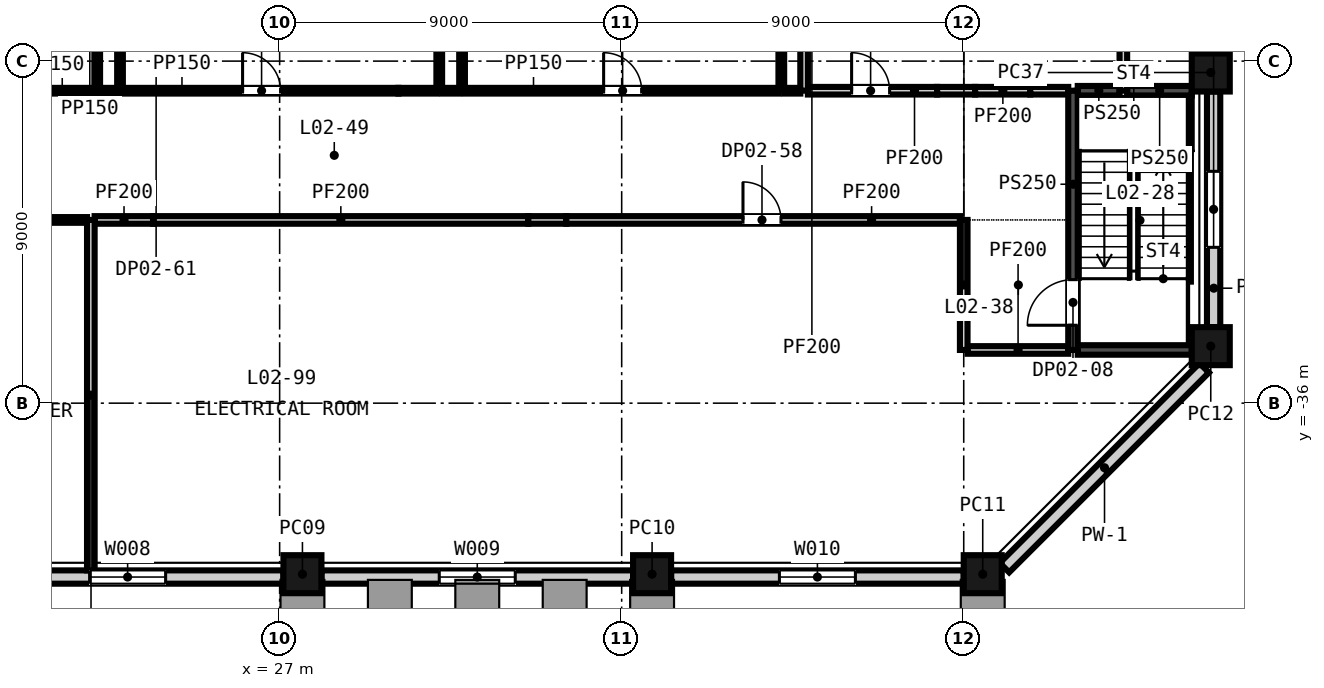
"""IFC4 building model, lengths in metres.
Left out: names, types, materials, properties, quantities, classifications, styles, units other than length and angle.
Written with IfcOpenShell. Run it as: python <this file> out.ifc"""

import sys

from ifc_helpers import new_model, si_unit, direction, frame, frame_2d, origin, origin_2d, place, context, subcontext, project, spatial, rectangle, extrude, element, fill, save


model = new_model("IFC4")
c1 = context("Model", 3, precision=1e-05, world=origin(), true_north=direction((0.0, 1.0)))
c2 = subcontext(c1, "Body", "Model", "MODEL_VIEW")
j1 = project(units=[si_unit("LENGTHUNIT", "METRE"), si_unit("PLANEANGLEUNIT", "RADIAN")], contexts=[c1])
p1 = place(None, origin())
s1 = spatial("IfcSite", under=j1, at=p1, CompositionType="ELEMENT")
p2 = place(p1, origin())
s2 = spatial("IfcBuilding", under=s1, at=p2, CompositionType="ELEMENT")
p3 = place(p2, frame((0.0, 0.0, 18.0)))
s3 = spatial("IfcBuildingStorey", under=s2, at=p3, CompositionType="ELEMENT", Elevation=18.0)
for number, where, z_axis, x_axis in (
    (1, (27.6, -40.5, -0.4), (0.0, 0.0, 1.0), (1.0, 0.0, 0.0)),
    (2, (36.8, -40.5, -0.4), (0.0, 0.0, 1.0), (1.0, 0.0, 0.0)),
    (3, (45.5, -40.5, -0.4), (0.0, 0.0, 1.0), (1.0, 0.0, 0.0)),
    (4, (51.5, -34.5, -0.4), (0.0, 0.0, 1.0), (0.0, 1.0, 0.0)),
    (5, (51.5, -27.3, -0.4), (0.0, 0.0, 1.0), (0.0, 1.0, 0.0)),
):
    element("IfcColumn", number, at=place(p3, frame(where, z_axis=z_axis, x_axis=x_axis)), inside=s3, PredefinedType="COLUMN", context=c2, shape_type="SweptSolid", body=[
        extrude(rectangle(XDim=1.0, YDim=1.0, at=origin_2d()), origin(), (0.0, 0.0, 1.0), 4.6),
    ])
p4 = place(p3, frame((18.9, -40.575, -0.4), z_axis=(0.0, 0.0, 1.0), x_axis=(1.0, 0.0, 0.0)))
e6 = element("IfcWall", 6, at=p4, inside=s3, PredefinedType="SOLIDWALL", context=c2, shape_type="SweptSolid", body=[
    extrude(rectangle(XDim=8.2, YDim=0.35, at=frame_2d((4.1, 0.0))), origin(), (0.0, 0.0, 1.0), 3.7),
])
p5 = place(p4, frame((3.1, 0.0, 1.3)))
e7 = element("IfcOpeningElement", 7, at=p5, cuts=e6, PredefinedType="OPENING", context=c2, shape_type="SweptSolid", body=[
    extrude(rectangle(XDim=2.0, YDim=2.35, at=frame_2d((1.0, 1.175))), frame((0.0, 0.185, 0.0), z_axis=(0.0, -1.0, 0.0), x_axis=(1.0, 0.0, 0.0)), (0.0, 0.0, 1.0), 0.37),
])
p6 = place(p3, frame((28.1, -40.575, -0.4), z_axis=(0.0, 0.0, 1.0), x_axis=(1.0, 0.0, 0.0)))
e8 = element("IfcWall", 8, at=p6, inside=s3, PredefinedType="SOLIDWALL", context=c2, shape_type="SweptSolid", body=[
    extrude(rectangle(XDim=8.2, YDim=0.35, at=frame_2d((4.1, 0.0))), origin(), (0.0, 0.0, 1.0), 3.7),
])
p7 = place(p6, frame((3.1, 0.0, 1.3)))
e9 = element("IfcOpeningElement", 9, at=p7, cuts=e8, PredefinedType="OPENING", context=c2, shape_type="SweptSolid", body=[
    extrude(rectangle(XDim=2.0, YDim=2.35, at=frame_2d((1.0, 1.175))), frame((0.0, 0.185, 0.0), z_axis=(0.0, -1.0, 0.0), x_axis=(1.0, 0.0, 0.0)), (0.0, 0.0, 1.0), 0.37),
])
p8 = place(p3, frame((37.3, -40.575, -0.4), z_axis=(0.0, 0.0, 1.0), x_axis=(1.0, 0.0, 0.0)))
e10 = element("IfcWall", 10, at=p8, inside=s3, PredefinedType="SOLIDWALL", context=c2, shape_type="SweptSolid", body=[
    extrude(rectangle(XDim=7.7, YDim=0.35, at=frame_2d((3.85, 0.0))), origin(), (0.0, 0.0, 1.0), 3.7),
])
p9 = place(p8, frame((2.85, 0.0, 1.3)))
e11 = element("IfcOpeningElement", 11, at=p9, cuts=e10, PredefinedType="OPENING", context=c2, shape_type="SweptSolid", body=[
    extrude(rectangle(XDim=2.0, YDim=2.35, at=frame_2d((1.0, 1.175))), frame((0.0, 0.185, 0.0), z_axis=(0.0, -1.0, 0.0), x_axis=(1.0, 0.0, 0.0)), (0.0, 0.0, 1.0), 0.37),
])
p10 = place(p3, frame((46.072, -40.327, -0.4), z_axis=(0.0, 0.0, 1.0), x_axis=(0.707106781187, 0.707106781187, 0.0)))
e12 = element("IfcWall", 12, at=p10, inside=s3, PredefinedType="SOLIDWALL", context=c2, shape_type="SweptSolid", body=[
    extrude(rectangle(XDim=7.433, YDim=0.35, at=frame_2d((3.716, 0.0))), origin(), (0.0, 0.0, 1.0), 3.7),
])
p11 = place(p3, frame((51.575, -34.0, -0.4), z_axis=(0.0, 0.0, 1.0), x_axis=(0.0, 1.0, 0.0)))
e13 = element("IfcWall", 13, at=p11, inside=s3, PredefinedType="SOLIDWALL", context=c2, shape_type="SweptSolid", body=[
    extrude(rectangle(XDim=6.2, YDim=0.35, at=frame_2d((3.1, 0.0))), origin(), (0.0, 0.0, 1.0), 3.7),
])
p12 = place(p11, frame((2.1, 0.0, 1.3)))
e14 = element("IfcOpeningElement", 14, at=p12, cuts=e13, PredefinedType="OPENING", context=c2, shape_type="SweptSolid", body=[
    extrude(rectangle(XDim=2.0, YDim=2.35, at=frame_2d((1.0, 1.175))), frame((0.0, 0.185, 0.0), z_axis=(0.0, -1.0, 0.0), x_axis=(1.0, 0.0, 0.0)), (0.0, 0.0, 1.0), 0.37),
])
p13 = place(p3, frame((45.1, -34.6, 0.0), z_axis=(0.0, 0.0, 1.0), x_axis=(1.0, 0.0, 0.0)))
e15 = element("IfcWall", 15, at=p13, inside=s3, PredefinedType="PARTITIONING", context=c2, shape_type="SweptSolid", body=[
    extrude(rectangle(XDim=2.65, YDim=0.2, at=frame_2d((1.325, 0.0))), origin(), (0.0, 0.0, 1.0), 4.2),
])
p14 = place(p3, frame((48.0, -34.6, 0.0), z_axis=(0.0, 0.0, 1.0), x_axis=(1.0, 0.0, 0.0)))
e16 = element("IfcWall", 16, at=p14, inside=s3, PredefinedType="SHEAR", context=c2, shape_type="SweptSolid", body=[
    extrude(rectangle(XDim=3.0, YDim=0.25, at=frame_2d((1.5, 0.0))), origin(), (0.0, 0.0, 1.0), 4.2),
])
p15 = place(p3, frame((17.814, -31.179, 0.0), z_axis=(0.0, 0.0, 1.0), x_axis=(1.0, 0.0, 0.0)))
e17 = element("IfcWall", 17, at=p15, inside=s3, PredefinedType="PARTITIONING", context=c2, shape_type="SweptSolid", body=[
    extrude(rectangle(XDim=4.118, YDim=0.15, at=frame_2d((2.059, 0.0))), origin(), (0.0, 0.0, 1.0), 4.2),
])
p16 = place(p15, frame((1.65, 0.0, 0.0)))
e18 = element("IfcOpeningElement", 18, at=p16, cuts=e17, PredefinedType="OPENING", context=c2, shape_type="SweptSolid", body=[
    extrude(rectangle(XDim=1.0, YDim=2.1, at=frame_2d((0.5, 1.05))), frame((0.0, 0.085, 0.0), z_axis=(0.0, -1.0, 0.0), x_axis=(1.0, 0.0, 0.0)), (0.0, 0.0, 1.0), 0.17),
])
p17 = place(p3, frame((22.132, -31.179, 0.0), z_axis=(0.0, 0.0, 1.0), x_axis=(1.0, 0.0, 0.0)))
e19 = element("IfcWall", 19, at=p17, inside=s3, PredefinedType="PARTITIONING", context=c2, shape_type="SweptSolid", body=[
    extrude(rectangle(XDim=1.537, YDim=0.2, at=frame_2d((0.769, 0.0))), origin(), (0.0, 0.0, 1.0), 3.111),
])
p18 = place(p3, frame((23.669, -31.179, 0.0), z_axis=(0.0, 0.0, 1.0), x_axis=(1.0, 0.0, 0.0)))
e20 = element("IfcWall", 20, at=p18, inside=s3, PredefinedType="PARTITIONING", context=c2, shape_type="SweptSolid", body=[
    extrude(rectangle(XDim=9.873, YDim=0.2, at=frame_2d((4.937, 0.0))), origin(), (0.0, 0.0, 1.0), 4.2),
])
p19 = place(p3, frame((33.542, -31.179, 0.0), z_axis=(0.0, 0.0, 1.0), x_axis=(1.0, 0.0, 0.0)))
e21 = element("IfcWall", 21, at=p19, inside=s3, PredefinedType="PARTITIONING", context=c2, shape_type="SweptSolid", body=[
    extrude(rectangle(XDim=1.0, YDim=0.2, at=frame_2d((0.5, 0.0))), origin(), (0.0, 0.0, 1.0), 3.111),
])
p20 = place(p3, frame((34.542, -31.179, 0.0), z_axis=(0.0, 0.0, 1.0), x_axis=(1.0, 0.0, 0.0)))
e22 = element("IfcWall", 22, at=p20, inside=s3, PredefinedType="PARTITIONING", context=c2, shape_type="SweptSolid", body=[
    extrude(rectangle(XDim=10.358, YDim=0.2, at=frame_2d((5.179, 0.0))), origin(), (0.0, 0.0, 1.0), 4.2),
])
p21 = place(p20, frame((4.65, 0.0, 0.0)))
e23 = element("IfcOpeningElement", 23, at=p21, cuts=e22, PredefinedType="OPENING", context=c2, shape_type="SweptSolid", body=[
    extrude(rectangle(XDim=1.0, YDim=2.1, at=frame_2d((0.5, 1.05))), frame((0.0, 0.11, 0.0), z_axis=(0.0, -1.0, 0.0), x_axis=(1.0, 0.0, 0.0)), (0.0, 0.0, 1.0), 0.22),
])
p22 = place(p3, frame((20.425, -27.779, 0.0), z_axis=(0.0, 0.0, 1.0), x_axis=(1.0, 0.0, 0.0)))
e24 = element("IfcWall", 24, at=p22, inside=s3, PredefinedType="PARTITIONING", context=c2, shape_type="SweptSolid", body=[
    extrude(rectangle(XDim=1.7, YDim=0.15, at=frame_2d((0.85, 0.0))), origin(), (0.0, 0.0, 1.0), 3.111),
])
p23 = place(p3, frame((22.275, -27.779, 0.0), z_axis=(0.0, 0.0, 1.0), x_axis=(1.0, 0.0, 0.0)))
e25 = element("IfcWall", 25, at=p23, inside=s3, PredefinedType="PARTITIONING", context=c2, shape_type="SweptSolid", body=[
    extrude(rectangle(XDim=0.45, YDim=0.15, at=frame_2d((0.225, 0.0))), origin(), (0.0, 0.0, 1.0), 4.2),
])
p24 = place(p3, frame((22.875, -27.779, 0.0), z_axis=(0.0, 0.0, 1.0), x_axis=(1.0, 0.0, 0.0)))
e26 = element("IfcWall", 26, at=p24, inside=s3, PredefinedType="PARTITIONING", context=c2, shape_type="SweptSolid", body=[
    extrude(rectangle(XDim=7.25, YDim=0.15, at=frame_2d((3.625, 0.0))), origin(), (0.0, 0.0, 1.0), 4.2),
])
p25 = place(p24, frame((3.15, 0.0, 0.0)))
e27 = element("IfcOpeningElement", 27, at=p25, cuts=e26, PredefinedType="OPENING", context=c2, shape_type="SweptSolid", body=[
    extrude(rectangle(XDim=1.0, YDim=2.1, at=frame_2d((0.5, 1.05))), frame((0.0, 0.085, 0.0), z_axis=(0.0, -1.0, 0.0), x_axis=(1.0, 0.0, 0.0)), (0.0, 0.0, 1.0), 0.17),
])
p26 = place(p3, frame((30.125, -27.779, 0.0), z_axis=(0.0, 0.0, 1.0), x_axis=(1.0, 0.0, 0.0)))
e28 = element("IfcWall", 28, at=p26, inside=s3, PredefinedType="PARTITIONING", context=c2, shape_type="SweptSolid", body=[
    extrude(rectangle(XDim=1.0, YDim=0.15, at=frame_2d((0.5, 0.0))), origin(), (0.0, 0.0, 1.0), 3.111),
])
p27 = place(p3, frame((31.275, -27.779, 0.0), z_axis=(0.0, 0.0, 1.0), x_axis=(1.0, 0.0, 0.0)))
e29 = element("IfcWall", 29, at=p27, inside=s3, PredefinedType="PARTITIONING", context=c2, shape_type="SweptSolid", body=[
    extrude(rectangle(XDim=0.45, YDim=0.15, at=frame_2d((0.225, 0.0))), origin(), (0.0, 0.0, 1.0), 4.2),
])
p28 = place(p3, frame((31.875, -27.779, 0.0), z_axis=(0.0, 0.0, 1.0), x_axis=(1.0, 0.0, 0.0)))
e30 = element("IfcWall", 30, at=p28, inside=s3, PredefinedType="PARTITIONING", context=c2, shape_type="SweptSolid", body=[
    extrude(rectangle(XDim=8.25, YDim=0.15, at=frame_2d((4.125, 0.0))), origin(), (0.0, 0.0, 1.0), 4.2),
])
p29 = place(p28, frame((3.65, 0.0, 0.0)))
e31 = element("IfcOpeningElement", 31, at=p29, cuts=e30, PredefinedType="OPENING", context=c2, shape_type="SweptSolid", body=[
    extrude(rectangle(XDim=1.0, YDim=2.1, at=frame_2d((0.5, 1.05))), frame((0.0, 0.085, 0.0), z_axis=(0.0, -1.0, 0.0), x_axis=(1.0, 0.0, 0.0)), (0.0, 0.0, 1.0), 0.17),
])
p30 = place(p3, frame((40.275, -27.779, 0.0), z_axis=(0.0, 0.0, 1.0), x_axis=(1.0, 0.0, 0.0)))
e32 = element("IfcWall", 32, at=p30, inside=s3, PredefinedType="PARTITIONING", context=c2, shape_type="SweptSolid", body=[
    extrude(rectangle(XDim=0.425, YDim=0.15, at=frame_2d((0.212, 0.0))), origin(), (0.0, 0.0, 1.0), 4.2),
])
p31 = place(p3, frame((40.9, -27.779, 0.0), z_axis=(0.0, 0.0, 1.0), x_axis=(1.0, 0.0, 0.0)))
e33 = element("IfcWall", 33, at=p31, inside=s3, PredefinedType="PARTITIONING", context=c2, shape_type="SweptSolid", body=[
    extrude(rectangle(XDim=3.4, YDim=0.2, at=frame_2d((1.7, 0.0))), origin(), (0.0, 0.0, 1.0), 4.2),
])
p32 = place(p31, frame((1.15, 0.0, 0.0)))
e34 = element("IfcOpeningElement", 34, at=p32, cuts=e33, PredefinedType="OPENING", context=c2, shape_type="SweptSolid", body=[
    extrude(rectangle(XDim=1.0, YDim=2.1, at=frame_2d((0.5, 1.05))), frame((0.0, 0.11, 0.0), z_axis=(0.0, -1.0, 0.0), x_axis=(1.0, 0.0, 0.0)), (0.0, 0.0, 1.0), 0.22),
])
p33 = place(p3, frame((44.3, -27.779, 0.0), z_axis=(0.0, 0.0, 1.0), x_axis=(1.0, 0.0, 0.0)))
e35 = element("IfcWall", 35, at=p33, inside=s3, PredefinedType="PARTITIONING", context=c2, shape_type="SweptSolid", body=[
    extrude(rectangle(XDim=1.0, YDim=0.2, at=frame_2d((0.5, 0.0))), origin(), (0.0, 0.0, 1.0), 3.597),
])
p34 = place(p3, frame((45.3, -27.779, 0.0), z_axis=(0.0, 0.0, 1.0), x_axis=(1.0, 0.0, 0.0)))
e36 = element("IfcWall", 36, at=p34, inside=s3, PredefinedType="PARTITIONING", context=c2, shape_type="SweptSolid", body=[
    extrude(rectangle(XDim=1.45, YDim=0.2, at=frame_2d((0.725, 0.0))), origin(), (0.0, 0.0, 1.0), 4.2),
])
p35 = place(p3, frame((46.75, -27.779, 0.0), z_axis=(0.0, 0.0, 1.0), x_axis=(1.0, 0.0, 0.0)))
e37 = element("IfcWall", 37, at=p35, inside=s3, PredefinedType="PARTITIONING", context=c2, shape_type="SweptSolid", body=[
    extrude(rectangle(XDim=1.0, YDim=0.2, at=frame_2d((0.5, 0.0))), origin(), (0.0, 0.0, 1.0), 3.667),
])
p36 = place(p3, frame((48.0, -27.779, 0.0), z_axis=(0.0, 0.0, 1.0), x_axis=(1.0, 0.0, 0.0)))
e38 = element("IfcWall", 38, at=p36, inside=s3, PredefinedType="SHEAR", context=c2, shape_type="SweptSolid", body=[
    extrude(rectangle(XDim=1.1, YDim=0.25, at=frame_2d((0.55, 0.0))), origin(), (0.0, 0.0, 1.0), 4.2),
])
p37 = place(p3, frame((49.3, -27.779, 0.0), z_axis=(0.0, 0.0, 1.0), x_axis=(1.0, 0.0, 0.0)))
e39 = element("IfcWall", 39, at=p37, inside=s3, PredefinedType="SHEAR", context=c2, shape_type="SweptSolid", body=[
    extrude(rectangle(XDim=1.7, YDim=0.25, at=frame_2d((0.85, 0.0))), origin(), (0.0, 0.0, 1.0), 4.2),
])
p38 = place(p3, frame((22.032, -40.4, 0.0), z_axis=(0.0, 0.0, 1.0), x_axis=(0.0, 1.0, 0.0)))
e40 = element("IfcWall", 40, at=p38, inside=s3, PredefinedType="PARTITIONING", context=c2, shape_type="SweptSolid", body=[
    extrude(rectangle(XDim=9.221, YDim=0.2, at=frame_2d((4.61, 0.0))), origin(), (0.0, 0.0, 1.0), 4.2),
])
for number, where, z_axis, x_axis in (
    (41, (22.2, -27.778, 0.0), (0.0, 0.0, 1.0), (0.0, 1.0, 0.0)),
    (42, (22.8, -27.778, 0.0), (0.0, 0.0, 1.0), (0.0, 1.0, 0.0)),
    (43, (31.2, -27.778, 0.0), (0.0, 0.0, 1.0), (0.0, 1.0, 0.0)),
    (44, (31.8, -27.778, 0.0), (0.0, 0.0, 1.0), (0.0, 1.0, 0.0)),
    (45, (40.2, -27.778, 0.0), (0.0, 0.0, 1.0), (0.0, 1.0, 0.0)),
):
    element("IfcWall", number, at=place(p3, frame(where, z_axis=z_axis, x_axis=x_axis)), inside=s3, PredefinedType="PARTITIONING", context=c2, shape_type="SweptSolid", body=[
        extrude(rectangle(XDim=1.578, YDim=0.15, at=frame_2d((0.789, 0.0))), origin(), (0.0, 0.0, 1.0), 4.2),
    ])
p39 = place(p3, frame((40.8, -27.778, 0.0), z_axis=(0.0, 0.0, 1.0), x_axis=(0.0, 1.0, 0.0)))
e46 = element("IfcWall", 46, at=p39, inside=s3, PredefinedType="PARTITIONING", context=c2, shape_type="SweptSolid", body=[
    extrude(rectangle(XDim=1.578, YDim=0.2, at=frame_2d((0.789, 0.0))), origin(), (0.0, 0.0, 1.0), 4.2),
])
p40 = place(p3, frame((45.0, -34.6, 0.0), z_axis=(0.0, 0.0, 1.0), x_axis=(0.0, 1.0, 0.0)))
e47 = element("IfcWall", 47, at=p40, inside=s3, PredefinedType="PARTITIONING", context=c2, shape_type="SweptSolid", body=[
    extrude(rectangle(XDim=3.421, YDim=0.2, at=frame_2d((1.71, 0.0))), origin(), (0.0, 0.0, 1.0), 4.2),
])
p41 = place(p3, frame((47.875, -34.6, 0.0), z_axis=(0.0, 0.0, 1.0), x_axis=(0.0, 1.0, 0.0)))
e48 = element("IfcWall", 48, at=p41, inside=s3, PredefinedType="SHEAR", context=c2, shape_type="SweptSolid", body=[
    extrude(rectangle(XDim=6.821, YDim=0.25, at=frame_2d((3.411, 0.0))), origin(), (0.0, 0.0, 1.0), 4.2),
])
p42 = place(p41, frame((0.65, 0.0, 0.0)))
e49 = element("IfcOpeningElement", 49, at=p42, cuts=e48, PredefinedType="OPENING", context=c2, shape_type="SweptSolid", body=[
    extrude(rectangle(XDim=1.2, YDim=2.1, at=frame_2d((0.6, 1.05))), frame((0.0, 0.135, 0.0), z_axis=(0.0, -1.0, 0.0), x_axis=(1.0, 0.0, 0.0)), (0.0, 0.0, 1.0), 0.27),
])
p43 = place(p3, frame((49.2, -27.778, 0.0), z_axis=(0.0, 0.0, 1.0), x_axis=(0.0, 1.0, 0.0)))
e50 = element("IfcWall", 50, at=p43, inside=s3, PredefinedType="PARTITIONING", context=c2, shape_type="SweptSolid", body=[
    extrude(rectangle(XDim=1.578, YDim=0.2, at=frame_2d((0.789, 0.0))), origin(), (0.0, 0.0, 1.0), 4.2),
])
p44 = place(p5, origin())
e51 = element("IfcWindow", 51, at=p44, inside=s3, PartitioningType="SINGLE_PANEL", PredefinedType="WINDOW", context=c2, shape_type="SweptSolid", body=[
    extrude(rectangle(XDim=2.0, YDim=2.35, at=frame_2d((1.0, 1.175))), frame((0.0, 0.03, 0.0), z_axis=(0.0, -1.0, 0.0), x_axis=(1.0, 0.0, 0.0)), (0.0, 0.0, 1.0), 0.06),
])
fill(e7, e51)
p45 = place(p7, origin())
e52 = element("IfcWindow", 52, at=p45, inside=s3, PartitioningType="SINGLE_PANEL", PredefinedType="WINDOW", context=c2, shape_type="SweptSolid", body=[
    extrude(rectangle(XDim=2.0, YDim=2.35, at=frame_2d((1.0, 1.175))), frame((0.0, 0.03, 0.0), z_axis=(0.0, -1.0, 0.0), x_axis=(1.0, 0.0, 0.0)), (0.0, 0.0, 1.0), 0.06),
])
fill(e9, e52)
p46 = place(p9, origin())
e53 = element("IfcWindow", 53, at=p46, inside=s3, PartitioningType="SINGLE_PANEL", PredefinedType="WINDOW", context=c2, shape_type="SweptSolid", body=[
    extrude(rectangle(XDim=2.0, YDim=2.35, at=frame_2d((1.0, 1.175))), frame((0.0, 0.03, 0.0), z_axis=(0.0, -1.0, 0.0), x_axis=(1.0, 0.0, 0.0)), (0.0, 0.0, 1.0), 0.06),
])
fill(e11, e53)
p47 = place(p12, origin())
e54 = element("IfcWindow", 54, at=p47, inside=s3, PartitioningType="SINGLE_PANEL", PredefinedType="WINDOW", context=c2, shape_type="SweptSolid", body=[
    extrude(rectangle(XDim=2.0, YDim=2.35, at=frame_2d((1.0, 1.175))), frame((0.0, 0.03, 0.0), z_axis=(0.0, -1.0, 0.0), x_axis=(1.0, 0.0, 0.0)), (0.0, 0.0, 1.0), 0.06),
])
fill(e14, e54)
p48 = place(p42, origin())
e55 = element("IfcDoor", 55, at=p48, inside=s3, OperationType="SINGLE_SWING_LEFT", PredefinedType="DOOR", context=c2, shape_type="SweptSolid", body=[
    extrude(rectangle(XDim=1.2, YDim=2.1, at=frame_2d((0.6, 1.05))), frame((0.0, 0.025, 0.0), z_axis=(0.0, -1.0, 0.0), x_axis=(1.0, 0.0, 0.0)), (0.0, 0.0, 1.0), 0.05),
])
fill(e49, e55)
p49 = place(p25, origin())
e56 = element("IfcDoor", 56, at=p49, inside=s3, OperationType="SINGLE_SWING_LEFT", PredefinedType="DOOR", context=c2, shape_type="SweptSolid", body=[
    extrude(rectangle(XDim=1.0, YDim=2.1, at=frame_2d((0.5, 1.05))), frame((0.0, 0.025, 0.0), z_axis=(0.0, -1.0, 0.0), x_axis=(1.0, 0.0, 0.0)), (0.0, 0.0, 1.0), 0.05),
])
fill(e27, e56)
p50 = place(p29, origin())
e57 = element("IfcDoor", 57, at=p50, inside=s3, OperationType="SINGLE_SWING_LEFT", PredefinedType="DOOR", context=c2, shape_type="SweptSolid", body=[
    extrude(rectangle(XDim=1.0, YDim=2.1, at=frame_2d((0.5, 1.05))), frame((0.0, 0.025, 0.0), z_axis=(0.0, -1.0, 0.0), x_axis=(1.0, 0.0, 0.0)), (0.0, 0.0, 1.0), 0.05),
])
fill(e31, e57)
p51 = place(p32, origin())
e58 = element("IfcDoor", 58, at=p51, inside=s3, OperationType="SINGLE_SWING_LEFT", PredefinedType="DOOR", context=c2, shape_type="SweptSolid", body=[
    extrude(rectangle(XDim=1.0, YDim=2.1, at=frame_2d((0.5, 1.05))), frame((0.0, 0.025, 0.0), z_axis=(0.0, -1.0, 0.0), x_axis=(1.0, 0.0, 0.0)), (0.0, 0.0, 1.0), 0.05),
])
fill(e34, e58)
p52 = place(p21, origin())
e59 = element("IfcDoor", 59, at=p52, inside=s3, OperationType="SINGLE_SWING_LEFT", PredefinedType="DOOR", context=c2, shape_type="SweptSolid", body=[
    extrude(rectangle(XDim=1.0, YDim=2.1, at=frame_2d((0.5, 1.05))), frame((0.0, 0.025, 0.0), z_axis=(0.0, -1.0, 0.0), x_axis=(1.0, 0.0, 0.0)), (0.0, 0.0, 1.0), 0.05),
])
fill(e23, e59)
save(model, sys.argv[1])
